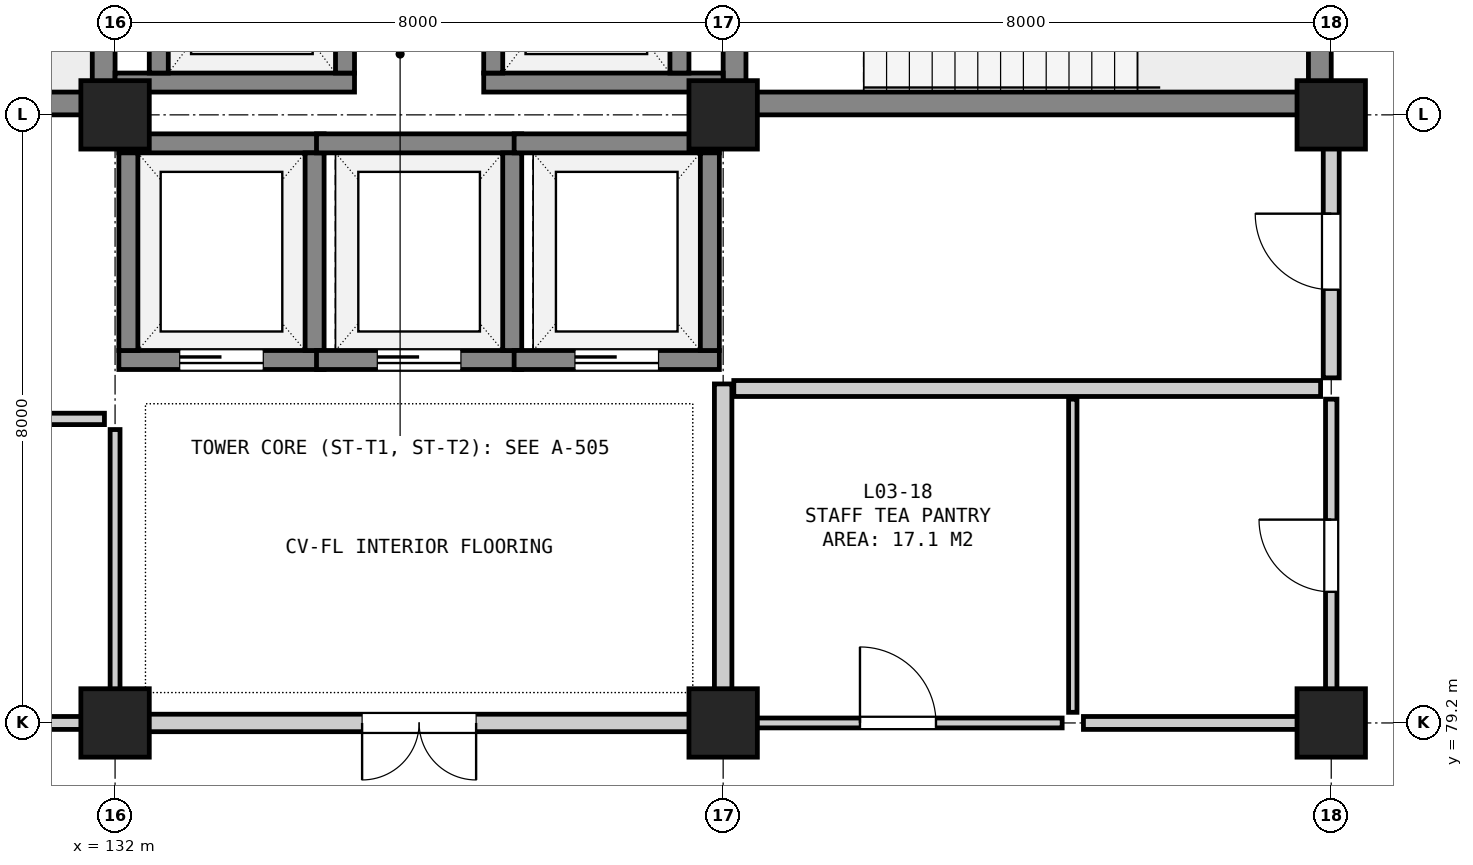
"""IFC4 building model, lengths in metres.
Left out: names, types, materials, properties, quantities, classifications, styles, units other than length and angle.
Written with IfcOpenShell. Run it as: python <this file> out.ifc"""

import sys

from ifc_helpers import new_model, si_unit, direction, frame, frame_2d, origin, origin_2d, place, context, subcontext, project, spatial, rectangle, extrude, element, fill, save


model = new_model("IFC4")
c1 = context("Model", 3, precision=1e-05, world=origin(), true_north=direction((0.0, 1.0)))
c2 = subcontext(c1, "Body", "Model", "MODEL_VIEW")
j1 = project(units=[si_unit("LENGTHUNIT", "METRE"), si_unit("PLANEANGLEUNIT", "RADIAN")], contexts=[c1])
p1 = place(None, origin())
s1 = spatial("IfcSite", under=j1, at=p1, CompositionType="ELEMENT")
p2 = place(p1, origin())
s2 = spatial("IfcBuilding", under=s1, at=p2, CompositionType="ELEMENT")
p3 = place(p2, frame((0.0, 0.0, 15.6)))
s3 = spatial("IfcBuildingStorey", under=s2, at=p3, CompositionType="ELEMENT", Elevation=15.6)
for number, where, z_axis, x_axis in (
    (1, (132.0, 79.2, 0.0), (0.0, 0.0, 1.0), (1.0, 0.0, 0.0)),
    (2, (132.0, 87.2, 0.0), (0.0, 0.0, 1.0), (1.0, 0.0, 0.0)),
    (3, (140.0, 79.2, 0.0), (0.0, 0.0, 1.0), (1.0, 0.0, 0.0)),
    (4, (140.0, 87.2, 0.0), (0.0, 0.0, 1.0), (1.0, 0.0, 0.0)),
    (5, (148.0, 79.2, 0.0), (0.0, 0.0, 1.0), (1.0, 0.0, 0.0)),
    (6, (148.0, 87.2, 0.0), (0.0, 0.0, 1.0), (1.0, 0.0, 0.0)),
):
    element("IfcColumn", number, at=place(p3, frame(where, z_axis=z_axis, x_axis=x_axis)), inside=s3, PredefinedType="COLUMN", context=c2, shape_type="SweptSolid", body=[
        extrude(rectangle(XDim=0.9, YDim=0.9, at=origin_2d()), origin(), (0.0, 0.0, 1.0), 4.2),
    ])
p4 = place(p3, frame((131.85, 87.2, 0.0), z_axis=(0.0, 0.0, 1.0), x_axis=(0.0, 1.0, 0.0)))
e7 = element("IfcWall", 7, at=p4, inside=s3, PredefinedType="SHEAR", context=c2, shape_type="SweptSolid", body=[
    extrude(rectangle(XDim=4.2, YDim=0.3, at=frame_2d((2.1, 0.0))), origin(), (0.0, 0.0, 1.0), 3.9),
])
p5 = place(p3, frame((124.3, 87.35, 0.0), z_axis=(0.0, 0.0, 1.0), x_axis=(1.0, 0.0, 0.0)))
e8 = element("IfcWall", 8, at=p5, inside=s3, PredefinedType="SHEAR", context=c2, shape_type="SweptSolid", body=[
    extrude(rectangle(XDim=7.4, YDim=0.3, at=frame_2d((3.7, 0.0))), origin(), (0.0, 0.0, 1.0), 3.9),
])
for number, where, z_axis, x_axis in (
    (9, (140.15, 87.2, 0.0), (0.0, 0.0, 1.0), (0.0, 1.0, 0.0)),
    (10, (147.85, 87.2, 0.0), (0.0, 0.0, 1.0), (0.0, 1.0, 0.0)),
):
    element("IfcWall", number, at=place(p3, frame(where, z_axis=z_axis, x_axis=x_axis)), inside=s3, PredefinedType="SHEAR", context=c2, shape_type="SweptSolid", body=[
        extrude(rectangle(XDim=4.2, YDim=0.3, at=frame_2d((2.1, 0.0))), origin(), (0.0, 0.0, 1.0), 3.9),
    ])
p6 = place(p3, frame((140.3, 87.35, 0.0), z_axis=(0.0, 0.0, 1.0), x_axis=(1.0, 0.0, 0.0)))
e11 = element("IfcWall", 11, at=p6, inside=s3, PredefinedType="SHEAR", context=c2, shape_type="SweptSolid", body=[
    extrude(rectangle(XDim=7.4, YDim=0.3, at=frame_2d((3.7, 0.0))), origin(), (0.0, 0.0, 1.0), 3.9),
])
p7 = place(p3, frame((132.0, 87.625, 0.0), z_axis=(0.0, 0.0, 1.0), x_axis=(1.0, 0.0, 0.0)))
e12 = element("IfcWall", 12, at=p7, inside=s3, PredefinedType="SHEAR", context=c2, shape_type="SweptSolid", body=[
    extrude(rectangle(XDim=3.15, YDim=0.25, at=frame_2d((1.575, 0.0))), origin(), (0.0, 0.0, 1.0), 3.9),
])
for number, where, z_axis, x_axis in (
    (13, (132.575, 87.75, 0.0), (0.0, 0.0, 1.0), (0.0, 1.0, 0.0)),
    (14, (135.025, 87.75, 0.0), (0.0, 0.0, 1.0), (0.0, 1.0, 0.0)),
):
    element("IfcWall", number, at=place(p3, frame(where, z_axis=z_axis, x_axis=x_axis)), inside=s3, PredefinedType="SHEAR", context=c2, shape_type="SweptSolid", body=[
        extrude(rectangle(XDim=2.9, YDim=0.25, at=frame_2d((1.45, 0.0))), origin(), (0.0, 0.0, 1.0), 3.9),
    ])
p8 = place(p3, frame((136.85, 87.625, 0.0), z_axis=(0.0, 0.0, 1.0), x_axis=(1.0, 0.0, 0.0)))
e15 = element("IfcWall", 15, at=p8, inside=s3, PredefinedType="SHEAR", context=c2, shape_type="SweptSolid", body=[
    extrude(rectangle(XDim=3.15, YDim=0.25, at=frame_2d((1.575, 0.0))), origin(), (0.0, 0.0, 1.0), 3.9),
])
for number, where, z_axis, x_axis in (
    (16, (136.975, 87.75, 0.0), (0.0, 0.0, 1.0), (0.0, 1.0, 0.0)),
    (17, (139.425, 87.75, 0.0), (0.0, 0.0, 1.0), (0.0, 1.0, 0.0)),
):
    element("IfcWall", number, at=place(p3, frame(where, z_axis=z_axis, x_axis=x_axis)), inside=s3, PredefinedType="SHEAR", context=c2, shape_type="SweptSolid", body=[
        extrude(rectangle(XDim=2.9, YDim=0.25, at=frame_2d((1.45, 0.0))), origin(), (0.0, 0.0, 1.0), 3.9),
    ])
p9 = place(p3, frame((132.05, 83.975, 0.0), z_axis=(0.0, 0.0, 1.0), x_axis=(1.0, 0.0, 0.0)))
e18 = element("IfcWall", 18, at=p9, inside=s3, PredefinedType="SHEAR", context=c2, shape_type="SweptSolid", body=[
    extrude(rectangle(XDim=2.7, YDim=0.25, at=frame_2d((1.35, 0.0))), origin(), (0.0, 0.0, 1.0), 3.9),
])
p10 = place(p9, frame((0.8, 0.0, 0.0)))
e19 = element("IfcOpeningElement", 19, at=p10, cuts=e18, PredefinedType="OPENING", context=c2, shape_type="SweptSolid", body=[
    extrude(rectangle(XDim=1.1, YDim=2.15, at=frame_2d((0.55, 1.075))), frame((0.0, 0.137, 0.0), z_axis=(0.0, -1.0, 0.0), x_axis=(1.0, 0.0, 0.0)), (0.0, 0.0, 1.0), 0.274),
])
p11 = place(p3, frame((132.05, 86.825, 0.0), z_axis=(0.0, 0.0, 1.0), x_axis=(1.0, 0.0, 0.0)))
e20 = element("IfcWall", 20, at=p11, inside=s3, PredefinedType="SHEAR", context=c2, shape_type="SweptSolid", body=[
    extrude(rectangle(XDim=2.7, YDim=0.25, at=frame_2d((1.35, 0.0))), origin(), (0.0, 0.0, 1.0), 3.9),
])
for number, where, z_axis, x_axis in (
    (21, (132.175, 84.1, 0.0), (0.0, 0.0, 1.0), (0.0, 1.0, 0.0)),
    (22, (134.625, 84.1, 0.0), (0.0, 0.0, 1.0), (0.0, 1.0, 0.0)),
):
    element("IfcWall", number, at=place(p3, frame(where, z_axis=z_axis, x_axis=x_axis)), inside=s3, PredefinedType="SHEAR", context=c2, shape_type="SweptSolid", body=[
        extrude(rectangle(XDim=2.6, YDim=0.25, at=frame_2d((1.3, 0.0))), origin(), (0.0, 0.0, 1.0), 3.9),
    ])
p12 = place(p3, frame((134.65, 83.975, 0.0), z_axis=(0.0, 0.0, 1.0), x_axis=(1.0, 0.0, 0.0)))
e23 = element("IfcWall", 23, at=p12, inside=s3, PredefinedType="SHEAR", context=c2, shape_type="SweptSolid", body=[
    extrude(rectangle(XDim=2.7, YDim=0.25, at=frame_2d((1.35, 0.0))), origin(), (0.0, 0.0, 1.0), 3.9),
])
p13 = place(p12, frame((0.8, 0.0, 0.0)))
e24 = element("IfcOpeningElement", 24, at=p13, cuts=e23, PredefinedType="OPENING", context=c2, shape_type="SweptSolid", body=[
    extrude(rectangle(XDim=1.1, YDim=2.15, at=frame_2d((0.55, 1.075))), frame((0.0, 0.137, 0.0), z_axis=(0.0, -1.0, 0.0), x_axis=(1.0, 0.0, 0.0)), (0.0, 0.0, 1.0), 0.274),
])
p14 = place(p3, frame((134.65, 86.825, 0.0), z_axis=(0.0, 0.0, 1.0), x_axis=(1.0, 0.0, 0.0)))
e25 = element("IfcWall", 25, at=p14, inside=s3, PredefinedType="SHEAR", context=c2, shape_type="SweptSolid", body=[
    extrude(rectangle(XDim=2.7, YDim=0.25, at=frame_2d((1.35, 0.0))), origin(), (0.0, 0.0, 1.0), 3.9),
])
p15 = place(p3, frame((137.225, 84.1, 0.0), z_axis=(0.0, 0.0, 1.0), x_axis=(0.0, 1.0, 0.0)))
e26 = element("IfcWall", 26, at=p15, inside=s3, PredefinedType="SHEAR", context=c2, shape_type="SweptSolid", body=[
    extrude(rectangle(XDim=2.6, YDim=0.25, at=frame_2d((1.3, 0.0))), origin(), (0.0, 0.0, 1.0), 3.9),
])
p16 = place(p3, frame((137.25, 83.975, 0.0), z_axis=(0.0, 0.0, 1.0), x_axis=(1.0, 0.0, 0.0)))
e27 = element("IfcWall", 27, at=p16, inside=s3, PredefinedType="SHEAR", context=c2, shape_type="SweptSolid", body=[
    extrude(rectangle(XDim=2.7, YDim=0.25, at=frame_2d((1.35, 0.0))), origin(), (0.0, 0.0, 1.0), 3.9),
])
p17 = place(p16, frame((0.8, 0.0, 0.0)))
e28 = element("IfcOpeningElement", 28, at=p17, cuts=e27, PredefinedType="OPENING", context=c2, shape_type="SweptSolid", body=[
    extrude(rectangle(XDim=1.1, YDim=2.15, at=frame_2d((0.55, 1.075))), frame((0.0, 0.137, 0.0), z_axis=(0.0, -1.0, 0.0), x_axis=(1.0, 0.0, 0.0)), (0.0, 0.0, 1.0), 0.274),
])
p18 = place(p3, frame((137.25, 86.825, 0.0), z_axis=(0.0, 0.0, 1.0), x_axis=(1.0, 0.0, 0.0)))
e29 = element("IfcWall", 29, at=p18, inside=s3, PredefinedType="SHEAR", context=c2, shape_type="SweptSolid", body=[
    extrude(rectangle(XDim=2.7, YDim=0.25, at=frame_2d((1.35, 0.0))), origin(), (0.0, 0.0, 1.0), 3.9),
])
p19 = place(p3, frame((139.825, 84.1, 0.0), z_axis=(0.0, 0.0, 1.0), x_axis=(0.0, 1.0, 0.0)))
e30 = element("IfcWall", 30, at=p19, inside=s3, PredefinedType="SHEAR", context=c2, shape_type="SweptSolid", body=[
    extrude(rectangle(XDim=2.6, YDim=0.25, at=frame_2d((1.3, 0.0))), origin(), (0.0, 0.0, 1.0), 3.9),
])
p20 = place(p3, frame((128.34, 79.2, 0.0), z_axis=(0.0, 0.0, 1.0), x_axis=(1.0, 0.0, 0.0)))
e31 = element("IfcWall", 31, at=p20, inside=s3, PredefinedType="PARTITIONING", context=c2, shape_type="SweptSolid", body=[
    extrude(rectangle(XDim=3.52, YDim=0.17, at=frame_2d((1.76, 0.0))), origin(), (0.0, 0.0, 1.0), 3.295),
])
p21 = place(p20, frame((1.235, 0.0, 0.0)))
e32 = element("IfcOpeningElement", 32, at=p21, cuts=e31, PredefinedType="OPENING", context=c2, shape_type="SweptSolid", body=[
    extrude(rectangle(XDim=1.05, YDim=2.15, at=frame_2d((0.525, 1.075))), frame((0.0, 0.097, 0.0), z_axis=(0.0, -1.0, 0.0), x_axis=(1.0, 0.0, 0.0)), (0.0, 0.0, 1.0), 0.194),
])
p22 = place(p3, frame((128.34, 83.2, 0.0), z_axis=(0.0, 0.0, 1.0), x_axis=(1.0, 0.0, 0.0)))
e33 = element("IfcWall", 33, at=p22, inside=s3, PredefinedType="PARTITIONING", context=c2, shape_type="SweptSolid", body=[
    extrude(rectangle(XDim=3.52, YDim=0.15, at=frame_2d((1.76, 0.0))), origin(), (0.0, 0.0, 1.0), 3.9),
])
p23 = place(p3, frame((132.0, 79.34, 0.0), z_axis=(0.0, 0.0, 1.0), x_axis=(0.0, 1.0, 0.0)))
e34 = element("IfcWall", 34, at=p23, inside=s3, PredefinedType="PARTITIONING", context=c2, shape_type="SweptSolid", body=[
    extrude(rectangle(XDim=3.72, YDim=0.13, at=frame_2d((1.86, 0.0))), origin(), (0.0, 0.0, 1.0), 3.395),
])
p24 = place(p3, frame((132.14, 79.2, 0.0), z_axis=(0.0, 0.0, 1.0), x_axis=(1.0, 0.0, 0.0)))
e35 = element("IfcWall", 35, at=p24, inside=s3, PredefinedType="SOLIDWALL", context=c2, shape_type="SweptSolid", body=[
    extrude(rectangle(XDim=7.72, YDim=0.23, at=frame_2d((3.86, 0.0))), origin(), (0.0, 0.0, 1.0), 3.295),
])
p25 = place(p24, frame((3.11, 0.0, 0.0)))
e36 = element("IfcOpeningElement", 36, at=p25, cuts=e35, PredefinedType="OPENING", context=c2, shape_type="SweptSolid", body=[
    extrude(rectangle(XDim=1.5, YDim=2.2, at=frame_2d((0.75, 1.1))), frame((0.0, 0.127, 0.0), z_axis=(0.0, -1.0, 0.0), x_axis=(1.0, 0.0, 0.0)), (0.0, 0.0, 1.0), 0.254),
])
p26 = place(p3, frame((140.0, 79.34, 0.0), z_axis=(0.0, 0.0, 1.0), x_axis=(0.0, 1.0, 0.0)))
e37 = element("IfcWall", 37, at=p26, inside=s3, PredefinedType="SOLIDWALL", context=c2, shape_type="SweptSolid", body=[
    extrude(rectangle(XDim=4.32, YDim=0.23, at=frame_2d((2.16, 0.0))), origin(), (0.0, 0.0, 1.0), 3.245),
])
p27 = place(p3, frame((140.14, 83.6, 0.0), z_axis=(0.0, 0.0, 1.0), x_axis=(1.0, 0.0, 0.0)))
e38 = element("IfcWall", 38, at=p27, inside=s3, PredefinedType="SOLIDWALL", context=c2, shape_type="SweptSolid", body=[
    extrude(rectangle(XDim=7.72, YDim=0.21, at=frame_2d((3.86, 0.0))), origin(), (0.0, 0.0, 1.0), 3.9),
])
p28 = place(p3, frame((148.0, 83.74, 0.0), z_axis=(0.0, 0.0, 1.0), x_axis=(0.0, 1.0, 0.0)))
e39 = element("IfcWall", 39, at=p28, inside=s3, PredefinedType="SOLIDWALL", context=c2, shape_type="SweptSolid", body=[
    extrude(rectangle(XDim=3.32, YDim=0.21, at=frame_2d((1.66, 0.0))), origin(), (0.0, 0.0, 1.0), 3.045),
])
p29 = place(p28, frame((1.16, 0.0, 0.0)))
e40 = element("IfcOpeningElement", 40, at=p29, cuts=e39, PredefinedType="OPENING", context=c2, shape_type="SweptSolid", body=[
    extrude(rectangle(XDim=1.0, YDim=2.15, at=frame_2d((0.5, 1.075))), frame((0.0, 0.117, 0.0), z_axis=(0.0, -1.0, 0.0), x_axis=(1.0, 0.0, 0.0)), (0.0, 0.0, 1.0), 0.234),
])
p30 = place(p3, frame((140.14, 79.2, 0.0), z_axis=(0.0, 0.0, 1.0), x_axis=(1.0, 0.0, 0.0)))
e41 = element("IfcWall", 41, at=p30, inside=s3, PredefinedType="PARTITIONING", context=c2, shape_type="SweptSolid", body=[
    extrude(rectangle(XDim=4.32, YDim=0.13, at=frame_2d((2.16, 0.0))), origin(), (0.0, 0.0, 1.0), 3.345),
])
p31 = place(p30, frame((1.66, 0.0, 0.0)))
e42 = element("IfcOpeningElement", 42, at=p31, cuts=e41, PredefinedType="OPENING", context=c2, shape_type="SweptSolid", body=[
    extrude(rectangle(XDim=1.0, YDim=2.15, at=frame_2d((0.5, 1.075))), frame((0.0, 0.077, 0.0), z_axis=(0.0, -1.0, 0.0), x_axis=(1.0, 0.0, 0.0)), (0.0, 0.0, 1.0), 0.154),
])
p32 = place(p3, frame((144.6, 79.34, 0.0), z_axis=(0.0, 0.0, 1.0), x_axis=(0.0, 1.0, 0.0)))
e43 = element("IfcWall", 43, at=p32, inside=s3, PredefinedType="PARTITIONING", context=c2, shape_type="SweptSolid", body=[
    extrude(rectangle(XDim=4.12, YDim=0.11, at=frame_2d((2.06, 0.0))), origin(), (0.0, 0.0, 1.0), 3.9),
])
p33 = place(p3, frame((144.74, 79.2, 0.0), z_axis=(0.0, 0.0, 1.0), x_axis=(1.0, 0.0, 0.0)))
e44 = element("IfcWall", 44, at=p33, inside=s3, PredefinedType="PARTITIONING", context=c2, shape_type="SweptSolid", body=[
    extrude(rectangle(XDim=3.12, YDim=0.17, at=frame_2d((1.56, 0.0))), origin(), (0.0, 0.0, 1.0), 3.345),
])
p34 = place(p3, frame((148.0, 79.34, 0.0), z_axis=(0.0, 0.0, 1.0), x_axis=(0.0, 1.0, 0.0)))
e45 = element("IfcWall", 45, at=p34, inside=s3, PredefinedType="PARTITIONING", context=c2, shape_type="SweptSolid", body=[
    extrude(rectangle(XDim=4.12, YDim=0.15, at=frame_2d((2.06, 0.0))), origin(), (0.0, 0.0, 1.0), 3.045),
])
p35 = place(p34, frame((1.585, 0.0, 0.0)))
e46 = element("IfcOpeningElement", 46, at=p35, cuts=e45, PredefinedType="OPENING", context=c2, shape_type="SweptSolid", body=[
    extrude(rectangle(XDim=0.95, YDim=2.15, at=frame_2d((0.475, 1.075))), frame((0.0, 0.087, 0.0), z_axis=(0.0, -1.0, 0.0), x_axis=(1.0, 0.0, 0.0)), (0.0, 0.0, 1.0), 0.174),
])
p36 = place(p10, origin())
e47 = element("IfcDoor", 47, at=p36, inside=s3, OperationType="SLIDING_TO_LEFT", PredefinedType="DOOR", context=c2, shape_type="SweptSolid", body=[
    extrude(rectangle(XDim=1.1, YDim=2.15, at=frame_2d((0.55, 1.075))), frame((0.0, 0.025, 0.0), z_axis=(0.0, -1.0, 0.0), x_axis=(1.0, 0.0, 0.0)), (0.0, 0.0, 1.0), 0.05),
])
fill(e19, e47)
p37 = place(p13, origin())
e48 = element("IfcDoor", 48, at=p37, inside=s3, OperationType="SLIDING_TO_LEFT", PredefinedType="DOOR", context=c2, shape_type="SweptSolid", body=[
    extrude(rectangle(XDim=1.1, YDim=2.15, at=frame_2d((0.55, 1.075))), frame((0.0, 0.025, 0.0), z_axis=(0.0, -1.0, 0.0), x_axis=(1.0, 0.0, 0.0)), (0.0, 0.0, 1.0), 0.05),
])
fill(e24, e48)
p38 = place(p17, origin())
e49 = element("IfcDoor", 49, at=p38, inside=s3, OperationType="SLIDING_TO_LEFT", PredefinedType="DOOR", context=c2, shape_type="SweptSolid", body=[
    extrude(rectangle(XDim=1.1, YDim=2.15, at=frame_2d((0.55, 1.075))), frame((0.0, 0.025, 0.0), z_axis=(0.0, -1.0, 0.0), x_axis=(1.0, 0.0, 0.0)), (0.0, 0.0, 1.0), 0.05),
])
fill(e28, e49)
p39 = place(p25, frame((1.5, 0.0, 0.0), z_axis=(0.0, 0.0, 1.0), x_axis=(-1.0, 0.0, 0.0)))
e50 = element("IfcDoor", 50, at=p39, inside=s3, OperationType="DOUBLE_DOOR_SINGLE_SWING", PredefinedType="DOOR", context=c2, shape_type="SweptSolid", body=[
    extrude(rectangle(XDim=1.5, YDim=2.2, at=frame_2d((0.75, 1.1))), frame((0.0, 0.025, 0.0), z_axis=(0.0, -1.0, 0.0), x_axis=(1.0, 0.0, 0.0)), (0.0, 0.0, 1.0), 0.05),
])
fill(e36, e50)
p40 = place(p29, origin())
e51 = element("IfcDoor", 51, at=p40, inside=s3, OperationType="SINGLE_SWING_RIGHT", PredefinedType="DOOR", context=c2, shape_type="SweptSolid", body=[
    extrude(rectangle(XDim=1.0, YDim=2.15, at=frame_2d((0.5, 1.075))), frame((0.0, 0.025, 0.0), z_axis=(0.0, -1.0, 0.0), x_axis=(1.0, 0.0, 0.0)), (0.0, 0.0, 1.0), 0.05),
])
fill(e40, e51)
p41 = place(p31, origin())
e52 = element("IfcDoor", 52, at=p41, inside=s3, OperationType="SINGLE_SWING_LEFT", PredefinedType="DOOR", context=c2, shape_type="SweptSolid", body=[
    extrude(rectangle(XDim=1.0, YDim=2.15, at=frame_2d((0.5, 1.075))), frame((0.0, 0.025, 0.0), z_axis=(0.0, -1.0, 0.0), x_axis=(1.0, 0.0, 0.0)), (0.0, 0.0, 1.0), 0.05),
])
fill(e42, e52)
p42 = place(p35, origin())
e53 = element("IfcDoor", 53, at=p42, inside=s3, OperationType="SINGLE_SWING_RIGHT", PredefinedType="DOOR", context=c2, shape_type="SweptSolid", body=[
    extrude(rectangle(XDim=0.95, YDim=2.15, at=frame_2d((0.475, 1.075))), frame((0.0, 0.025, 0.0), z_axis=(0.0, -1.0, 0.0), x_axis=(1.0, 0.0, 0.0)), (0.0, 0.0, 1.0), 0.05),
])
fill(e46, e53)
save(model, sys.argv[1])
